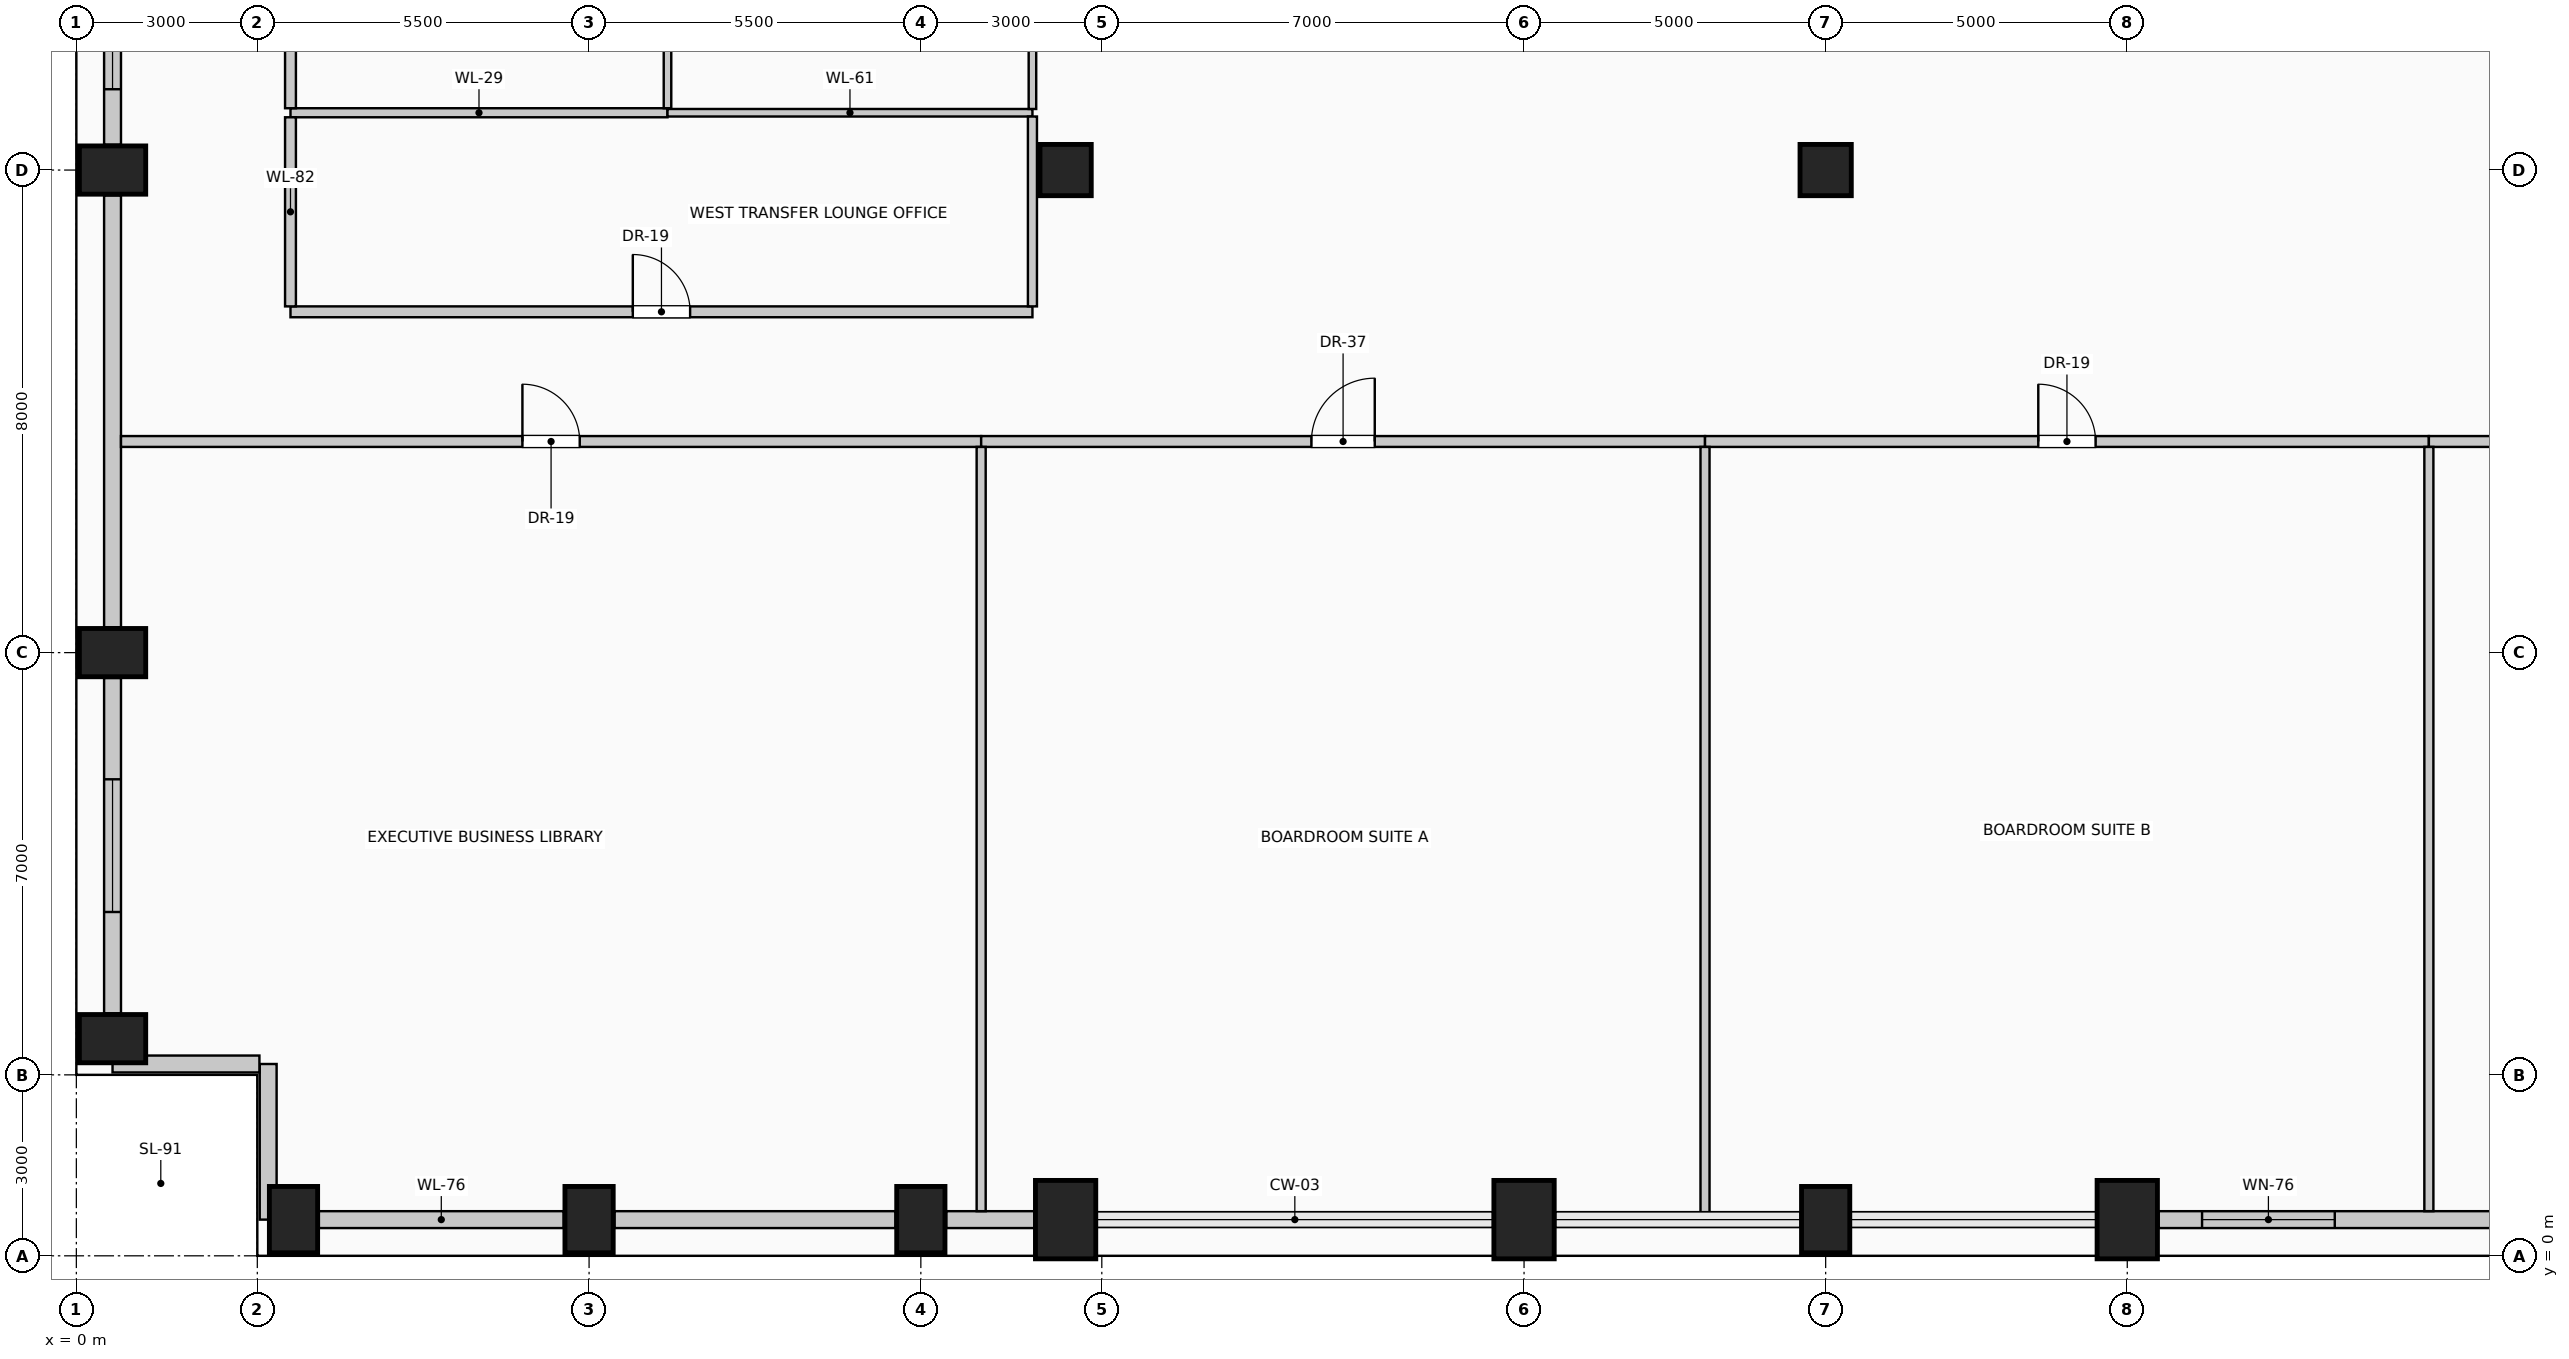
"""IFC4 building model, lengths in metres.
Left out: names, types, materials, properties, quantities, classifications, styles, units other than length and angle.
Written with IfcOpenShell. Run it as: python <this file> out.ifc"""

import sys

from ifc_helpers import new_model, si_unit, direction, frame, frame_2d, origin, origin_2d, place, context, subcontext, project, spatial, rectangle, circle, extrude, element, fill, save


model = new_model("IFC4")
c1 = context("Model", 3, precision=1e-05, world=origin(), true_north=direction((0.0, 1.0)))
c2 = subcontext(c1, "Body", "Model", "MODEL_VIEW")
j1 = project(units=[si_unit("LENGTHUNIT", "METRE"), si_unit("PLANEANGLEUNIT", "RADIAN")], contexts=[c1])
p1 = place(None, origin())
s1 = spatial("IfcSite", under=j1, at=p1, CompositionType="ELEMENT")
p2 = place(p1, origin())
s2 = spatial("IfcBuilding", under=s1, at=p2, CompositionType="ELEMENT")
p3 = place(p2, frame((0.0, 0.0, 165.8)))
s3 = spatial("IfcBuildingStorey", under=s2, at=p3, CompositionType="ELEMENT", Elevation=165.8)
for number, where, z_axis, x_axis in (
    (1, (3.6, 0.6, 0.0), (0.0, 0.0, 1.0), (1.0, 0.0, 0.0)),
    (2, (8.5, 0.6, 0.0), (0.0, 0.0, 1.0), (1.0, 0.0, 0.0)),
    (3, (14.0, 0.6, 0.0), (0.0, 0.0, 1.0), (1.0, 0.0, 0.0)),
):
    element("IfcColumn", number, at=place(p3, frame(where, z_axis=z_axis, x_axis=x_axis)), inside=s3, PredefinedType="COLUMN", context=c2, shape_type="SweptSolid", body=[
        extrude(rectangle(XDim=0.8, YDim=1.1, at=origin_2d()), origin(), (0.0, 0.0, 1.0), 4.8),
    ])
for number, where, z_axis, x_axis in (
    (4, (16.4, 0.6, 0.0), (0.0, 0.0, 1.0), (1.0, 0.0, 0.0)),
    (5, (24.0, 0.6, 0.0), (0.0, 0.0, 1.0), (1.0, 0.0, 0.0)),
):
    element("IfcColumn", number, at=place(p3, frame(where, z_axis=z_axis, x_axis=x_axis)), inside=s3, PredefinedType="COLUMN", context=c2, shape_type="SweptSolid", body=[
        extrude(rectangle(XDim=1.0, YDim=1.3, at=origin_2d()), origin(), (0.0, 0.0, 1.0), 4.8),
    ])
p4 = place(p3, frame((29.0, 0.6, 0.0), z_axis=(0.0, 0.0, 1.0), x_axis=(1.0, 0.0, 0.0)))
e6 = element("IfcColumn", 6, at=p4, inside=s3, PredefinedType="COLUMN", context=c2, shape_type="SweptSolid", body=[
    extrude(rectangle(XDim=0.8, YDim=1.1, at=origin_2d()), origin(), (0.0, 0.0, 1.0), 4.8),
])
p5 = place(p3, frame((34.0, 0.6, 0.0), z_axis=(0.0, 0.0, 1.0), x_axis=(1.0, 0.0, 0.0)))
e7 = element("IfcColumn", 7, at=p5, inside=s3, PredefinedType="COLUMN", context=c2, shape_type="SweptSolid", body=[
    extrude(rectangle(XDim=1.0, YDim=1.3, at=origin_2d()), origin(), (0.0, 0.0, 1.0), 4.8),
])
for number, where, z_axis, x_axis in (
    (8, (0.6, 3.6, 0.0), (0.0, 0.0, 1.0), (0.0, 1.0, 0.0)),
    (9, (0.6, 10.0, 0.0), (0.0, 0.0, 1.0), (0.0, 1.0, 0.0)),
    (10, (0.6, 18.0, 0.0), (0.0, 0.0, 1.0), (0.0, 1.0, 0.0)),
):
    element("IfcColumn", number, at=place(p3, frame(where, z_axis=z_axis, x_axis=x_axis)), inside=s3, PredefinedType="COLUMN", context=c2, shape_type="SweptSolid", body=[
        extrude(rectangle(XDim=0.8, YDim=1.1, at=origin_2d()), origin(), (0.0, 0.0, 1.0), 4.8),
    ])
for number, where, z_axis, x_axis in (
    (11, (16.4, 18.0, 0.0), (0.0, 0.0, 1.0), (1.0, 0.0, 0.0)),
    (12, (29.0, 18.0, 0.0), (0.0, 0.0, 1.0), (1.0, 0.0, 0.0)),
):
    element("IfcColumn", number, at=place(p3, frame(where, z_axis=z_axis, x_axis=x_axis)), inside=s3, PredefinedType="COLUMN", context=c2, shape_type="SweptSolid", body=[
        extrude(circle(Radius=0.425, at=origin_2d()), origin(), (0.0, 0.0, 1.0), 4.8),
    ])
p6 = place(p3, frame((8.08, 0.6, 0.0), z_axis=(0.0, 0.0, 1.0), x_axis=(-1.0, 0.0, 0.0)))
e13 = element("IfcWall", 13, at=p6, inside=s3, PredefinedType="SOLIDWALL", context=c2, shape_type="SweptSolid", body=[
    extrude(rectangle(XDim=4.06, YDim=0.28, at=frame_2d((2.03, 0.0))), origin(), (0.0, 0.0, 1.0), 3.675),
])
p7 = place(p3, frame((13.58, 0.6, 0.0), z_axis=(0.0, 0.0, 1.0), x_axis=(-1.0, 0.0, 0.0)))
e14 = element("IfcWall", 14, at=p7, inside=s3, PredefinedType="SOLIDWALL", context=c2, shape_type="SweptSolid", body=[
    extrude(rectangle(XDim=4.66, YDim=0.28, at=frame_2d((2.33, 0.0))), origin(), (0.0, 0.0, 1.0), 3.675),
])
p8 = place(p3, frame((15.88, 0.6, 0.0), z_axis=(0.0, 0.0, 1.0), x_axis=(-1.0, 0.0, 0.0)))
e15 = element("IfcWall", 15, at=p8, inside=s3, PredefinedType="SOLIDWALL", context=c2, shape_type="SweptSolid", body=[
    extrude(rectangle(XDim=1.46, YDim=0.28, at=frame_2d((0.73, 0.0))), origin(), (0.0, 0.0, 1.0), 3.675),
])
p9 = place(p3, frame((41.08, 0.6, 0.0), z_axis=(0.0, 0.0, 1.0), x_axis=(-1.0, 0.0, 0.0)))
e16 = element("IfcWall", 16, at=p9, inside=s3, PredefinedType="SOLIDWALL", context=c2, shape_type="SweptSolid", body=[
    extrude(rectangle(XDim=6.56, YDim=0.28, at=frame_2d((3.28, 0.0))), origin(), (0.0, 0.0, 1.0), 3.675),
])
p10 = place(p9, frame((3.64, 0.0, 0.5)))
e17 = element("IfcOpeningElement", 17, at=p10, cuts=e16, PredefinedType="OPENING", context=c2, shape_type="SweptSolid", body=[
    extrude(rectangle(XDim=2.2, YDim=1.95, at=frame_2d((1.1, 0.975))), frame((0.0, 0.15, 0.0), z_axis=(0.0, -1.0, 0.0), x_axis=(1.0, 0.0, 0.0)), (0.0, 0.0, 1.0), 0.3),
])
p11 = place(p3, frame((0.6, 4.02, 0.0), z_axis=(0.0, 0.0, 1.0), x_axis=(0.0, 1.0, 0.0)))
e18 = element("IfcWall", 18, at=p11, inside=s3, PredefinedType="SOLIDWALL", context=c2, shape_type="SweptSolid", body=[
    extrude(rectangle(XDim=5.56, YDim=0.28, at=frame_2d((2.78, 0.0))), origin(), (0.0, 0.0, 1.0), 3.675),
])
p12 = place(p11, frame((1.68, 0.0, 0.5)))
e19 = element("IfcOpeningElement", 19, at=p12, cuts=e18, PredefinedType="OPENING", context=c2, shape_type="SweptSolid", body=[
    extrude(rectangle(XDim=2.2, YDim=1.95, at=frame_2d((1.1, 0.975))), frame((0.0, 0.15, 0.0), z_axis=(0.0, -1.0, 0.0), x_axis=(1.0, 0.0, 0.0)), (0.0, 0.0, 1.0), 0.3),
])
p13 = place(p3, frame((0.6, 10.42, 0.0), z_axis=(0.0, 0.0, 1.0), x_axis=(0.0, 1.0, 0.0)))
e20 = element("IfcWall", 20, at=p13, inside=s3, PredefinedType="SOLIDWALL", context=c2, shape_type="SweptSolid", body=[
    extrude(rectangle(XDim=7.16, YDim=0.28, at=frame_2d((3.58, 0.0))), origin(), (0.0, 0.0, 1.0), 3.675),
])
p14 = place(p3, frame((0.6, 18.42, 0.0), z_axis=(0.0, 0.0, 1.0), x_axis=(0.0, 1.0, 0.0)))
e21 = element("IfcWall", 21, at=p14, inside=s3, PredefinedType="SOLIDWALL", context=c2, shape_type="SweptSolid", body=[
    extrude(rectangle(XDim=7.16, YDim=0.28, at=frame_2d((3.58, 0.0))), origin(), (0.0, 0.0, 1.0), 3.675),
])
p15 = place(p14, frame((0.92, 0.0, 0.5)))
e22 = element("IfcOpeningElement", 22, at=p15, cuts=e21, PredefinedType="OPENING", context=c2, shape_type="SweptSolid", body=[
    extrude(rectangle(XDim=2.2, YDim=1.95, at=frame_2d((1.1, 0.975))), frame((0.0, 0.15, 0.0), z_axis=(0.0, -1.0, 0.0), x_axis=(1.0, 0.0, 0.0)), (0.0, 0.0, 1.0), 0.3),
])
p16 = place(p3, frame((3.18, 0.6, 0.0), z_axis=(0.0, 0.0, 1.0), x_axis=(0.0, 1.0, 0.0)))
e23 = element("IfcWall", 23, at=p16, inside=s3, PredefinedType="SOLIDWALL", context=c2, shape_type="SweptSolid", body=[
    extrude(rectangle(XDim=2.58, YDim=0.28, at=frame_2d((1.29, 0.0))), origin(), (0.0, 0.0, 1.0), 4.525),
])
p17 = place(p3, frame((3.035, 3.18, 0.0), z_axis=(0.0, 0.0, 1.0), x_axis=(-1.0, 0.0, 0.0)))
e24 = element("IfcWall", 24, at=p17, inside=s3, PredefinedType="SOLIDWALL", context=c2, shape_type="SweptSolid", body=[
    extrude(rectangle(XDim=2.435, YDim=0.28, at=frame_2d((1.217, 0.0))), origin(), (0.0, 0.0, 1.0), 4.525),
])
p18 = place(p3, frame((0.74, 13.5, 0.0), z_axis=(0.0, 0.0, 1.0), x_axis=(1.0, 0.0, 0.0)))
e25 = element("IfcWall", 25, at=p18, inside=s3, PredefinedType="PARTITIONING", context=c2, shape_type="SweptSolid", body=[
    extrude(rectangle(XDim=14.26, YDim=0.18, at=frame_2d((7.13, 0.0))), origin(), (0.0, 0.0, 1.0), 4.525),
])
p19 = place(p18, frame((6.655, 0.0, 0.0)))
e26 = element("IfcOpeningElement", 26, at=p19, cuts=e25, PredefinedType="OPENING", context=c2, shape_type="SweptSolid", body=[
    extrude(rectangle(XDim=0.95, YDim=2.15, at=frame_2d((0.475, 1.075))), frame((0.0, 0.1, 0.0), z_axis=(0.0, -1.0, 0.0), x_axis=(1.0, 0.0, 0.0)), (0.0, 0.0, 1.0), 0.2),
])
p20 = place(p3, frame((15.0, 13.5, 0.0), z_axis=(0.0, 0.0, 1.0), x_axis=(1.0, 0.0, 0.0)))
e27 = element("IfcWall", 27, at=p20, inside=s3, PredefinedType="PARTITIONING", context=c2, shape_type="SweptSolid", body=[
    extrude(rectangle(XDim=12.0, YDim=0.18, at=frame_2d((6.0, 0.0))), origin(), (0.0, 0.0, 1.0), 4.525),
])
p21 = place(p20, frame((5.475, 0.0, 0.0)))
e28 = element("IfcOpeningElement", 28, at=p21, cuts=e27, PredefinedType="OPENING", context=c2, shape_type="SweptSolid", body=[
    extrude(rectangle(XDim=1.05, YDim=2.15, at=frame_2d((0.525, 1.075))), frame((0.0, 0.1, 0.0), z_axis=(0.0, -1.0, 0.0), x_axis=(1.0, 0.0, 0.0)), (0.0, 0.0, 1.0), 0.2),
])
p22 = place(p3, frame((27.0, 13.5, 0.0), z_axis=(0.0, 0.0, 1.0), x_axis=(1.0, 0.0, 0.0)))
e29 = element("IfcWall", 29, at=p22, inside=s3, PredefinedType="PARTITIONING", context=c2, shape_type="SweptSolid", body=[
    extrude(rectangle(XDim=12.0, YDim=0.18, at=frame_2d((6.0, 0.0))), origin(), (0.0, 0.0, 1.0), 4.525),
])
p23 = place(p22, frame((5.525, 0.0, 0.0)))
e30 = element("IfcOpeningElement", 30, at=p23, cuts=e29, PredefinedType="OPENING", context=c2, shape_type="SweptSolid", body=[
    extrude(rectangle(XDim=0.95, YDim=2.15, at=frame_2d((0.475, 1.075))), frame((0.0, 0.1, 0.0), z_axis=(0.0, -1.0, 0.0), x_axis=(1.0, 0.0, 0.0)), (0.0, 0.0, 1.0), 0.2),
])
p24 = place(p3, frame((39.0, 13.5, 0.0), z_axis=(0.0, 0.0, 1.0), x_axis=(1.0, 0.0, 0.0)))
e31 = element("IfcWall", 31, at=p24, inside=s3, PredefinedType="PARTITIONING", context=c2, shape_type="SweptSolid", body=[
    extrude(rectangle(XDim=18.26, YDim=0.18, at=frame_2d((9.13, 0.0))), origin(), (0.0, 0.0, 1.0), 4.525),
])
p25 = place(p24, frame((8.605, 0.0, 0.0)))
e32 = element("IfcOpeningElement", 32, at=p25, cuts=e31, PredefinedType="OPENING", context=c2, shape_type="SweptSolid", body=[
    extrude(rectangle(XDim=1.05, YDim=2.15, at=frame_2d((0.525, 1.075))), frame((0.0, 0.1, 0.0), z_axis=(0.0, -1.0, 0.0), x_axis=(1.0, 0.0, 0.0)), (0.0, 0.0, 1.0), 0.2),
])
p26 = place(p3, frame((3.55, 15.65, 0.0), z_axis=(0.0, 0.0, 1.0), x_axis=(1.0, 0.0, 0.0)))
e33 = element("IfcWall", 33, at=p26, inside=s3, PredefinedType="PARTITIONING", context=c2, shape_type="SweptSolid", body=[
    extrude(rectangle(XDim=12.3, YDim=0.18, at=frame_2d((6.15, 0.0))), origin(), (0.0, 0.0, 1.0), 4.525),
])
p27 = place(p26, frame((5.675, 0.0, 0.0)))
e34 = element("IfcOpeningElement", 34, at=p27, cuts=e33, PredefinedType="OPENING", context=c2, shape_type="SweptSolid", body=[
    extrude(rectangle(XDim=0.95, YDim=2.15, at=frame_2d((0.475, 1.075))), frame((0.0, 0.1, 0.0), z_axis=(0.0, -1.0, 0.0), x_axis=(1.0, 0.0, 0.0)), (0.0, 0.0, 1.0), 0.2),
])
p28 = place(p3, frame((3.55, 18.95, 0.0), z_axis=(0.0, 0.0, 1.0), x_axis=(1.0, 0.0, 0.0)))
e35 = element("IfcWall", 35, at=p28, inside=s3, PredefinedType="PARTITIONING", context=c2, shape_type="SweptSolid", body=[
    extrude(rectangle(XDim=6.25, YDim=0.15, at=frame_2d((3.125, 0.0))), origin(), (0.0, 0.0, 1.0), 4.525),
])
p29 = place(p3, frame((9.8, 18.95, 0.0), z_axis=(0.0, 0.0, 1.0), x_axis=(1.0, 0.0, 0.0)))
e36 = element("IfcWall", 36, at=p29, inside=s3, PredefinedType="PARTITIONING", context=c2, shape_type="SweptSolid", body=[
    extrude(rectangle(XDim=6.05, YDim=0.125, at=frame_2d((3.025, 0.0))), origin(), (0.0, 0.0, 1.0), 4.525),
])
p30 = place(p3, frame((3.55, 15.74, 0.0), z_axis=(0.0, 0.0, 1.0), x_axis=(0.0, 1.0, 0.0)))
e37 = element("IfcWall", 37, at=p30, inside=s3, PredefinedType="PARTITIONING", context=c2, shape_type="SweptSolid", body=[
    extrude(rectangle(XDim=3.135, YDim=0.18, at=frame_2d((1.567, 0.0))), origin(), (0.0, 0.0, 1.0), 4.525),
])
p31 = place(p3, frame((3.55, 19.025, 0.0), z_axis=(0.0, 0.0, 1.0), x_axis=(0.0, 1.0, 0.0)))
e38 = element("IfcWall", 38, at=p31, inside=s3, PredefinedType="PARTITIONING", context=c2, shape_type="SweptSolid", body=[
    extrude(rectangle(XDim=5.7, YDim=0.18, at=frame_2d((2.85, 0.0))), origin(), (0.0, 0.0, 1.0), 4.525),
])
p32 = place(p3, frame((9.8, 19.025, 0.0), z_axis=(0.0, 0.0, 1.0), x_axis=(0.0, 1.0, 0.0)))
e39 = element("IfcWall", 39, at=p32, inside=s3, PredefinedType="PARTITIONING", context=c2, shape_type="SweptSolid", body=[
    extrude(rectangle(XDim=5.7, YDim=0.125, at=frame_2d((2.85, 0.0))), origin(), (0.0, 0.0, 1.0), 4.525),
])
p33 = place(p3, frame((15.0, 0.74, 0.0), z_axis=(0.0, 0.0, 1.0), x_axis=(0.0, 1.0, 0.0)))
e40 = element("IfcWall", 40, at=p33, inside=s3, PredefinedType="PARTITIONING", context=c2, shape_type="SweptSolid", body=[
    extrude(rectangle(XDim=12.67, YDim=0.15, at=frame_2d((6.335, 0.0))), origin(), (0.0, 0.0, 1.0), 4.525),
])
p34 = place(p3, frame((15.85, 15.74, 0.0), z_axis=(0.0, 0.0, 1.0), x_axis=(0.0, 1.0, 0.0)))
e41 = element("IfcWall", 41, at=p34, inside=s3, PredefinedType="PARTITIONING", context=c2, shape_type="SweptSolid", body=[
    extrude(rectangle(XDim=3.147, YDim=0.15, at=frame_2d((1.574, 0.0))), origin(), (0.0, 0.0, 1.0), 4.525),
])
p35 = place(p3, frame((15.85, 19.012, 0.0), z_axis=(0.0, 0.0, 1.0), x_axis=(0.0, 1.0, 0.0)))
e42 = element("IfcWall", 42, at=p35, inside=s3, PredefinedType="PARTITIONING", context=c2, shape_type="SweptSolid", body=[
    extrude(rectangle(XDim=5.725, YDim=0.125, at=frame_2d((2.863, 0.0))), origin(), (0.0, 0.0, 1.0), 4.525),
])
p36 = place(p3, frame((27.0, 0.6, 0.0), z_axis=(0.0, 0.0, 1.0), x_axis=(0.0, 1.0, 0.0)))
e43 = element("IfcWall", 43, at=p36, inside=s3, PredefinedType="PARTITIONING", context=c2, shape_type="SweptSolid", body=[
    extrude(rectangle(XDim=12.81, YDim=0.15, at=frame_2d((6.405, 0.0))), origin(), (0.0, 0.0, 1.0), 4.525),
])
p37 = place(p3, frame((39.0, 0.74, 0.0), z_axis=(0.0, 0.0, 1.0), x_axis=(0.0, 1.0, 0.0)))
e44 = element("IfcWall", 44, at=p37, inside=s3, PredefinedType="PARTITIONING", context=c2, shape_type="SweptSolid", body=[
    extrude(rectangle(XDim=12.67, YDim=0.15, at=frame_2d((6.335, 0.0))), origin(), (0.0, 0.0, 1.0), 4.525),
])
p38 = place(p10, origin())
e45 = element("IfcWindow", 45, at=p38, inside=s3, PartitioningType="SINGLE_PANEL", PredefinedType="WINDOW", context=c2, shape_type="SweptSolid", body=[
    extrude(rectangle(XDim=2.2, YDim=1.95, at=frame_2d((1.1, 0.975))), frame((0.0, 0.03, 0.0), z_axis=(0.0, -1.0, 0.0), x_axis=(1.0, 0.0, 0.0)), (0.0, 0.0, 1.0), 0.06),
])
fill(e17, e45)
p39 = place(p12, origin())
e46 = element("IfcWindow", 46, at=p39, inside=s3, PartitioningType="SINGLE_PANEL", PredefinedType="WINDOW", context=c2, shape_type="SweptSolid", body=[
    extrude(rectangle(XDim=2.2, YDim=1.95, at=frame_2d((1.1, 0.975))), frame((0.0, 0.03, 0.0), z_axis=(0.0, -1.0, 0.0), x_axis=(1.0, 0.0, 0.0)), (0.0, 0.0, 1.0), 0.06),
])
fill(e19, e46)
p40 = place(p15, origin())
e47 = element("IfcWindow", 47, at=p40, inside=s3, PartitioningType="SINGLE_PANEL", PredefinedType="WINDOW", context=c2, shape_type="SweptSolid", body=[
    extrude(rectangle(XDim=2.2, YDim=1.95, at=frame_2d((1.1, 0.975))), frame((0.0, 0.03, 0.0), z_axis=(0.0, -1.0, 0.0), x_axis=(1.0, 0.0, 0.0)), (0.0, 0.0, 1.0), 0.06),
])
fill(e22, e47)
p41 = place(p19, origin())
e48 = element("IfcDoor", 48, at=p41, inside=s3, OperationType="SINGLE_SWING_LEFT", PredefinedType="DOOR", context=c2, shape_type="SweptSolid", body=[
    extrude(rectangle(XDim=0.95, YDim=2.15, at=frame_2d((0.475, 1.075))), frame((0.0, 0.025, 0.0), z_axis=(0.0, -1.0, 0.0), x_axis=(1.0, 0.0, 0.0)), (0.0, 0.0, 1.0), 0.05),
])
fill(e26, e48)
p42 = place(p21, origin())
e49 = element("IfcDoor", 49, at=p42, inside=s3, OperationType="SINGLE_SWING_RIGHT", PredefinedType="DOOR", context=c2, shape_type="SweptSolid", body=[
    extrude(rectangle(XDim=1.05, YDim=2.15, at=frame_2d((0.525, 1.075))), frame((0.0, 0.025, 0.0), z_axis=(0.0, -1.0, 0.0), x_axis=(1.0, 0.0, 0.0)), (0.0, 0.0, 1.0), 0.05),
])
fill(e28, e49)
p43 = place(p23, origin())
e50 = element("IfcDoor", 50, at=p43, inside=s3, OperationType="SINGLE_SWING_LEFT", PredefinedType="DOOR", context=c2, shape_type="SweptSolid", body=[
    extrude(rectangle(XDim=0.95, YDim=2.15, at=frame_2d((0.475, 1.075))), frame((0.0, 0.025, 0.0), z_axis=(0.0, -1.0, 0.0), x_axis=(1.0, 0.0, 0.0)), (0.0, 0.0, 1.0), 0.05),
])
fill(e30, e50)
p44 = place(p27, origin())
e51 = element("IfcDoor", 51, at=p44, inside=s3, OperationType="SINGLE_SWING_LEFT", PredefinedType="DOOR", context=c2, shape_type="SweptSolid", body=[
    extrude(rectangle(XDim=0.95, YDim=2.15, at=frame_2d((0.475, 1.075))), frame((0.0, 0.025, 0.0), z_axis=(0.0, -1.0, 0.0), x_axis=(1.0, 0.0, 0.0)), (0.0, 0.0, 1.0), 0.05),
])
fill(e34, e51)
save(model, sys.argv[1])
